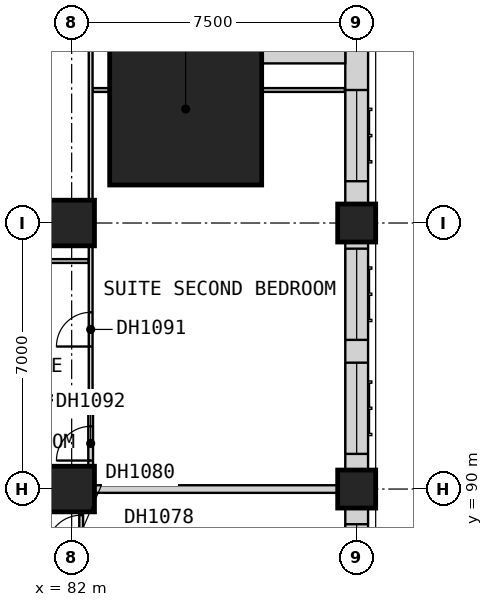
"""IFC4 building model, lengths in metres.
Left out: names, types, materials, properties, quantities, classifications, styles, units other than length and angle.
Written with IfcOpenShell. Run it as: python <this file> out.ifc"""

import sys

from ifc_helpers import new_model, si_unit, direction, frame, frame_2d, origin, origin_2d, place, context, subcontext, project, spatial, rectangle, extrude, element, fill, save


model = new_model("IFC4")
c1 = context("Model", 3, precision=1e-05, world=origin(), true_north=direction((0.0, 1.0)))
c2 = subcontext(c1, "Body", "Model", "MODEL_VIEW")
j1 = project(units=[si_unit("LENGTHUNIT", "METRE"), si_unit("PLANEANGLEUNIT", "RADIAN")], contexts=[c1])
p1 = place(None, origin())
s1 = spatial("IfcSite", under=j1, at=p1, CompositionType="ELEMENT")
p2 = place(p1, origin())
s2 = spatial("IfcBuilding", under=s1, at=p2, CompositionType="ELEMENT")
p3 = place(p2, frame((0.0, 0.0, 34.0)))
s3 = spatial("IfcBuildingStorey", under=s2, at=p3, CompositionType="ELEMENT", Elevation=34.0)
for number, where, z_axis, x_axis in (
    (1, (82.0, 90.0, 0.0), (0.0, 0.0, 1.0), (1.0, 0.0, 0.0)),
    (2, (82.0, 97.0, 0.0), (0.0, 0.0, 1.0), (1.0, 0.0, 0.0)),
):
    element("IfcColumn", number, at=place(p3, frame(where, z_axis=z_axis, x_axis=x_axis)), inside=s3, PredefinedType="COLUMN", context=c2, shape_type="SweptSolid", body=[
        extrude(rectangle(XDim=1.2, YDim=1.2, at=origin_2d()), origin(), (0.0, 0.0, 1.0), 3.6),
    ])
for number, where, z_axis, x_axis in (
    (3, (89.5, 90.0, 0.0), (0.0, 0.0, 1.0), (1.0, 0.0, 0.0)),
    (4, (89.5, 97.0, 0.0), (0.0, 0.0, 1.0), (1.0, 0.0, 0.0)),
):
    element("IfcColumn", number, at=place(p3, frame(where, z_axis=z_axis, x_axis=x_axis)), inside=s3, PredefinedType="COLUMN", context=c2, shape_type="SweptSolid", body=[
        extrude(rectangle(XDim=1.0, YDim=1.0, at=origin_2d()), origin(), (0.0, 0.0, 1.0), 3.6),
    ])
p4 = place(p3, frame((85.0, 100.0, 0.0), z_axis=(0.0, 0.0, 1.0), x_axis=(1.0, 0.0, 0.0)))
e5 = element("IfcColumn", 5, at=p4, inside=s3, PredefinedType="COLUMN", context=c2, shape_type="SweptSolid", body=[
    extrude(rectangle(XDim=4.0, YDim=4.0, at=origin_2d()), origin(), (0.0, 0.0, 1.0), 3.6),
])
p5 = place(p3, frame((89.5, 83.0, 0.0), z_axis=(0.0, 0.0, 1.0), x_axis=(0.0, 1.0, 0.0)))
e6 = element("IfcWall", 6, at=p5, inside=s3, PredefinedType="SOLIDWALL", context=c2, shape_type="SweptSolid", body=[
    extrude(rectangle(XDim=6.5, YDim=0.6, at=frame_2d((3.25, 0.0))), origin(), (0.0, 0.0, 1.0), 2.85),
])
p6 = place(p5, frame((0.425, 0.0, 0.8)))
e7 = element("IfcOpeningElement", 7, at=p6, cuts=e6, PredefinedType="OPENING", context=c2, shape_type="SweptSolid", body=[
    extrude(rectangle(XDim=2.4, YDim=1.8, at=frame_2d((1.2, 0.9))), frame((0.0, 0.31, 0.0), z_axis=(0.0, -1.0, 0.0), x_axis=(1.0, 0.0, 0.0)), (0.0, 0.0, 1.0), 0.62),
])
p7 = place(p5, frame((3.675, 0.0, 0.8)))
e8 = element("IfcOpeningElement", 8, at=p7, cuts=e6, PredefinedType="OPENING", context=c2, shape_type="SweptSolid", body=[
    extrude(rectangle(XDim=2.4, YDim=1.8, at=frame_2d((1.2, 0.9))), frame((0.0, 0.31, 0.0), z_axis=(0.0, -1.0, 0.0), x_axis=(1.0, 0.0, 0.0)), (0.0, 0.0, 1.0), 0.62),
])
p8 = place(p3, frame((89.5, 90.5, 0.0), z_axis=(0.0, 0.0, 1.0), x_axis=(0.0, 1.0, 0.0)))
e9 = element("IfcWall", 9, at=p8, inside=s3, PredefinedType="SOLIDWALL", context=c2, shape_type="SweptSolid", body=[
    extrude(rectangle(XDim=6.0, YDim=0.6, at=frame_2d((3.0, 0.0))), origin(), (0.0, 0.0, 1.0), 2.85),
])
p9 = place(p8, frame((0.425, 0.0, 0.8)))
e10 = element("IfcOpeningElement", 10, at=p9, cuts=e9, PredefinedType="OPENING", context=c2, shape_type="SweptSolid", body=[
    extrude(rectangle(XDim=2.4, YDim=1.8, at=frame_2d((1.2, 0.9))), frame((0.0, 0.31, 0.0), z_axis=(0.0, -1.0, 0.0), x_axis=(1.0, 0.0, 0.0)), (0.0, 0.0, 1.0), 0.62),
])
p10 = place(p8, frame((3.425, 0.0, 0.8)))
e11 = element("IfcOpeningElement", 11, at=p10, cuts=e9, PredefinedType="OPENING", context=c2, shape_type="SweptSolid", body=[
    extrude(rectangle(XDim=2.4, YDim=1.8, at=frame_2d((1.2, 0.9))), frame((0.0, 0.31, 0.0), z_axis=(0.0, -1.0, 0.0), x_axis=(1.0, 0.0, 0.0)), (0.0, 0.0, 1.0), 0.62),
])
p11 = place(p3, frame((89.5, 97.5, 0.0), z_axis=(0.0, 0.0, 1.0), x_axis=(0.0, 1.0, 0.0)))
e12 = element("IfcWall", 12, at=p11, inside=s3, PredefinedType="SOLIDWALL", context=c2, shape_type="SweptSolid", body=[
    extrude(rectangle(XDim=4.5, YDim=0.6, at=frame_2d((2.25, 0.0))), origin(), (0.0, 0.0, 1.0), 3.35),
])
p12 = place(p11, frame((0.6, 0.0, 0.8)))
e13 = element("IfcOpeningElement", 13, at=p12, cuts=e12, PredefinedType="OPENING", context=c2, shape_type="SweptSolid", body=[
    extrude(rectangle(XDim=2.4, YDim=1.8, at=frame_2d((1.2, 0.9))), frame((0.0, 0.31, 0.0), z_axis=(0.0, -1.0, 0.0), x_axis=(1.0, 0.0, 0.0)), (0.0, 0.0, 1.0), 0.62),
])
p13 = place(p3, frame((89.2, 101.5, 0.0), z_axis=(0.0, 0.0, 1.0), x_axis=(-1.0, 0.0, 0.0)))
e14 = element("IfcWall", 14, at=p13, inside=s3, PredefinedType="SOLIDWALL", context=c2, shape_type="SweptSolid", body=[
    extrude(rectangle(XDim=2.2, YDim=0.6, at=frame_2d((1.1, 0.0))), origin(), (0.0, 0.0, 1.0), 3.35),
])
p14 = place(p3, frame((77.475, 90.0, 0.0), z_axis=(0.0, 0.0, 1.0), x_axis=(1.0, 0.0, 0.0)))
e15 = element("IfcWall", 15, at=p14, inside=s3, PredefinedType="PARTITIONING", context=c2, shape_type="SweptSolid", body=[
    extrude(rectangle(XDim=12.525, YDim=0.2, at=frame_2d((6.262, 0.0))), origin(), (0.0, 0.0, 1.0), 3.35),
])
p15 = place(p3, frame((75.1, 96.0, 0.0), z_axis=(0.0, 0.0, 1.0), x_axis=(1.0, 0.0, 0.0)))
e16 = element("IfcWall", 16, at=p15, inside=s3, PredefinedType="PARTITIONING", context=c2, shape_type="SweptSolid", body=[
    extrude(rectangle(XDim=7.35, YDim=0.1, at=frame_2d((3.675, 0.0))), origin(), (0.0, 0.0, 1.0), 3.35),
])
p16 = place(p15, frame((0.65, 0.0, 0.0)))
e17 = element("IfcOpeningElement", 17, at=p16, cuts=e16, PredefinedType="OPENING", context=c2, shape_type="SweptSolid", body=[
    extrude(rectangle(XDim=0.9, YDim=2.1, at=frame_2d((0.45, 1.05))), frame((0.0, 0.06, 0.0), z_axis=(0.0, -1.0, 0.0), x_axis=(1.0, 0.0, 0.0)), (0.0, 0.0, 1.0), 0.12),
])
p17 = place(p3, frame((82.55, 100.5, 0.0), z_axis=(0.0, 0.0, 1.0), x_axis=(1.0, 0.0, 0.0)))
e18 = element("IfcWall", 18, at=p17, inside=s3, PredefinedType="PARTITIONING", context=c2, shape_type="SweptSolid", body=[
    extrude(rectangle(XDim=6.64, YDim=0.1, at=frame_2d((3.32, 0.0))), origin(), (0.0, 0.0, 1.0), 3.35),
])
p18 = place(p3, frame((82.25, 88.188, 0.0), z_axis=(0.0, 0.0, 1.0), x_axis=(0.0, 1.0, 0.0)))
e19 = element("IfcWall", 19, at=p18, inside=s3, PredefinedType="PARTITIONING", context=c2, shape_type="SweptSolid", body=[
    extrude(rectangle(XDim=1.712, YDim=0.1, at=frame_2d((0.856, 0.0))), origin(), (0.0, 0.0, 1.0), 3.35),
])
p19 = place(p18, frame((0.225, 0.0, 0.0)))
e20 = element("IfcOpeningElement", 20, at=p19, cuts=e19, PredefinedType="OPENING", context=c2, shape_type="SweptSolid", body=[
    extrude(rectangle(XDim=0.9, YDim=2.1, at=frame_2d((0.45, 1.05))), frame((0.0, 0.06, 0.0), z_axis=(0.0, -1.0, 0.0), x_axis=(1.0, 0.0, 0.0)), (0.0, 0.0, 1.0), 0.12),
])
p20 = place(p3, frame((82.5, 92.462, 0.0), z_axis=(0.0, 0.0, 1.0), x_axis=(0.0, 1.0, 0.0)))
e21 = element("IfcWall", 21, at=p20, inside=s3, PredefinedType="PARTITIONING", context=c2, shape_type="SweptSolid", body=[
    extrude(rectangle(XDim=11.728, YDim=0.1, at=frame_2d((5.864, 0.0))), origin(), (0.0, 0.0, 1.0), 3.35),
])
p21 = place(p20, frame((9.837, 0.0, 0.0)))
e22 = element("IfcOpeningElement", 22, at=p21, cuts=e21, PredefinedType="OPENING", context=c2, shape_type="SweptSolid", body=[
    extrude(rectangle(XDim=0.9, YDim=2.1, at=frame_2d((0.45, 1.05))), frame((0.0, 0.06, 0.0), z_axis=(0.0, -1.0, 0.0), x_axis=(1.0, 0.0, 0.0)), (0.0, 0.0, 1.0), 0.12),
])
p22 = place(p20, frame((1.288, 0.0, 0.0)))
e23 = element("IfcOpeningElement", 23, at=p22, cuts=e21, PredefinedType="OPENING", context=c2, shape_type="SweptSolid", body=[
    extrude(rectangle(XDim=0.9, YDim=2.1, at=frame_2d((0.45, 1.05))), frame((0.0, 0.06, 0.0), z_axis=(0.0, -1.0, 0.0), x_axis=(1.0, 0.0, 0.0)), (0.0, 0.0, 1.0), 0.12),
])
p23 = place(p3, frame((77.475, 92.4, 0.0), z_axis=(0.0, 0.0, 1.0), x_axis=(1.0, 0.0, 0.0)))
e24 = element("IfcWall", 24, at=p23, inside=s3, PredefinedType="PARTITIONING", context=c2, shape_type="SweptSolid", body=[
    extrude(rectangle(XDim=5.025, YDim=0.125, at=frame_2d((2.512, 0.0))), origin(), (0.0, 0.0, 1.0), 3.35),
])
p24 = place(p3, frame((82.5, 90.1, 0.0), z_axis=(0.0, 0.0, 1.0), x_axis=(0.0, 1.0, 0.0)))
e25 = element("IfcWall", 25, at=p24, inside=s3, PredefinedType="PARTITIONING", context=c2, shape_type="SweptSolid", body=[
    extrude(rectangle(XDim=2.237, YDim=0.125, at=frame_2d((1.119, 0.0))), origin(), (0.0, 0.0, 1.0), 3.35),
])
p25 = place(p24, frame((0.65, 0.0, 0.0)))
e26 = element("IfcOpeningElement", 26, at=p25, cuts=e25, PredefinedType="OPENING", context=c2, shape_type="SweptSolid", body=[
    extrude(rectangle(XDim=0.9, YDim=2.1, at=frame_2d((0.45, 1.05))), frame((0.0, 0.073, 0.0), z_axis=(0.0, -1.0, 0.0), x_axis=(1.0, 0.0, 0.0)), (0.0, 0.0, 1.0), 0.145),
])
p26 = place(p7, origin())
e27 = element("IfcWindow", 27, at=p26, inside=s3, PartitioningType="SINGLE_PANEL", PredefinedType="WINDOW", context=c2, shape_type="SweptSolid", body=[
    extrude(rectangle(XDim=2.4, YDim=1.8, at=frame_2d((1.2, 0.9))), frame((0.0, -0.07, 0.0), z_axis=(0.0, -1.0, 0.0), x_axis=(1.0, 0.0, 0.0)), (0.0, 0.0, 1.0), 0.06),
])
fill(e8, e27)
p27 = place(p9, origin())
e28 = element("IfcWindow", 28, at=p27, inside=s3, PartitioningType="SINGLE_PANEL", PredefinedType="WINDOW", context=c2, shape_type="SweptSolid", body=[
    extrude(rectangle(XDim=2.4, YDim=1.8, at=frame_2d((1.2, 0.9))), frame((0.0, -0.07, 0.0), z_axis=(0.0, -1.0, 0.0), x_axis=(1.0, 0.0, 0.0)), (0.0, 0.0, 1.0), 0.06),
])
fill(e10, e28)
p28 = place(p10, origin())
e29 = element("IfcWindow", 29, at=p28, inside=s3, PartitioningType="SINGLE_PANEL", PredefinedType="WINDOW", context=c2, shape_type="SweptSolid", body=[
    extrude(rectangle(XDim=2.4, YDim=1.8, at=frame_2d((1.2, 0.9))), frame((0.0, -0.07, 0.0), z_axis=(0.0, -1.0, 0.0), x_axis=(1.0, 0.0, 0.0)), (0.0, 0.0, 1.0), 0.06),
])
fill(e11, e29)
p29 = place(p12, origin())
e30 = element("IfcWindow", 30, at=p29, inside=s3, PartitioningType="SINGLE_PANEL", PredefinedType="WINDOW", context=c2, shape_type="SweptSolid", body=[
    extrude(rectangle(XDim=2.4, YDim=1.8, at=frame_2d((1.2, 0.9))), frame((0.0, -0.07, 0.0), z_axis=(0.0, -1.0, 0.0), x_axis=(1.0, 0.0, 0.0)), (0.0, 0.0, 1.0), 0.06),
])
fill(e13, e30)
p30 = place(p19, origin())
e31 = element("IfcDoor", 31, at=p30, inside=s3, OperationType="SINGLE_SWING_LEFT", PredefinedType="DOOR", context=c2, shape_type="SweptSolid", body=[
    extrude(rectangle(XDim=0.9, YDim=2.1, at=frame_2d((0.45, 1.05))), frame((0.0, 0.025, 0.0), z_axis=(0.0, -1.0, 0.0), x_axis=(1.0, 0.0, 0.0)), (0.0, 0.0, 1.0), 0.05),
])
fill(e20, e31)
p31 = place(p22, origin())
e32 = element("IfcDoor", 32, at=p31, inside=s3, OperationType="SINGLE_SWING_RIGHT", PredefinedType="DOOR", context=c2, shape_type="SweptSolid", body=[
    extrude(rectangle(XDim=0.9, YDim=2.1, at=frame_2d((0.45, 1.05))), frame((0.0, 0.025, 0.0), z_axis=(0.0, -1.0, 0.0), x_axis=(1.0, 0.0, 0.0)), (0.0, 0.0, 1.0), 0.05),
])
fill(e23, e32)
p32 = place(p25, origin())
e33 = element("IfcDoor", 33, at=p32, inside=s3, OperationType="SINGLE_SWING_LEFT", PredefinedType="DOOR", context=c2, shape_type="SweptSolid", body=[
    extrude(rectangle(XDim=0.9, YDim=2.1, at=frame_2d((0.45, 1.05))), frame((0.0, 0.025, 0.0), z_axis=(0.0, -1.0, 0.0), x_axis=(1.0, 0.0, 0.0)), (0.0, 0.0, 1.0), 0.05),
])
fill(e26, e33)
save(model, sys.argv[1])
